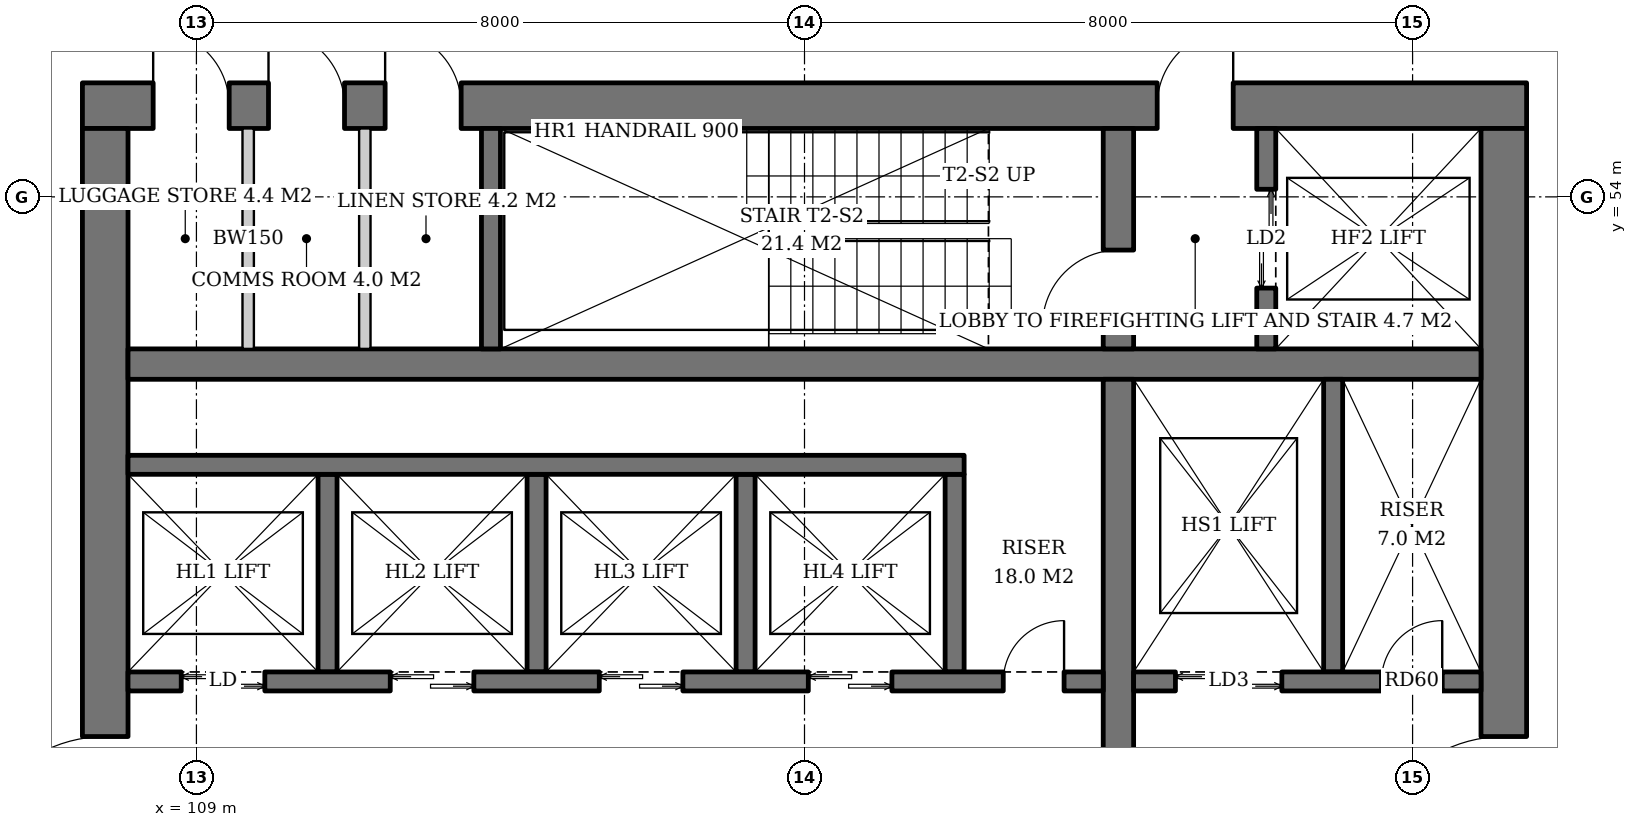
"""IFC4 building model, lengths in metres.
Left out: names, types, materials, properties, quantities, classifications, styles, units other than length and angle.
Written with IfcOpenShell. Run it as: python <this file> out.ifc"""

import sys

from ifc_helpers import new_model, si_unit, direction, frame, frame_2d, origin, place, context, subcontext, project, spatial, rectangle, extrude, element, fill, save


model = new_model("IFC4")
c1 = context("Model", 3, precision=1e-05, world=origin(), true_north=direction((0.0, 1.0)))
c2 = subcontext(c1, "Body", "Model", "MODEL_VIEW")
j1 = project(units=[si_unit("LENGTHUNIT", "METRE"), si_unit("PLANEANGLEUNIT", "RADIAN")], contexts=[c1])
p1 = place(None, origin())
s1 = spatial("IfcSite", under=j1, at=p1, CompositionType="ELEMENT")
p2 = place(p1, origin())
s2 = spatial("IfcBuilding", under=s1, at=p2, CompositionType="ELEMENT")
p3 = place(p2, frame((0.0, 0.0, 127.4)))
s3 = spatial("IfcBuildingStorey", under=s2, at=p3, CompositionType="ELEMENT", Elevation=127.4)
p4 = place(p3, frame((107.5, 55.2, 0.0), z_axis=(0.0, 0.0, 1.0), x_axis=(1.0, 0.0, 0.0)))
e1 = element("IfcWall", 1, at=p4, inside=s3, PredefinedType="SHEAR", context=c2, shape_type="SweptSolid", body=[
    extrude(rectangle(XDim=19.0, YDim=0.6, at=frame_2d((9.5, 0.0))), origin(), (0.0, 0.0, 1.0), 3.8),
])
p5 = place(p4, frame((14.14, 0.0, 0.0)))
e2 = element("IfcOpeningElement", 2, at=p5, cuts=e1, PredefinedType="OPENING", context=c2, shape_type="SweptSolid", body=[
    extrude(rectangle(XDim=1.0, YDim=2.1, at=frame_2d((0.5, 1.05))), frame((0.0, 0.31, 0.0), z_axis=(0.0, -1.0, 0.0), x_axis=(1.0, 0.0, 0.0)), (0.0, 0.0, 1.0), 0.62),
])
p6 = place(p4, frame((0.931, 0.0, 0.0)))
e3 = element("IfcOpeningElement", 3, at=p6, cuts=e1, PredefinedType="OPENING", context=c2, shape_type="SweptSolid", body=[
    extrude(rectangle(XDim=1.0, YDim=2.1, at=frame_2d((0.5, 1.05))), frame((0.0, 0.31, 0.0), z_axis=(0.0, -1.0, 0.0), x_axis=(1.0, 0.0, 0.0)), (0.0, 0.0, 1.0), 0.62),
])
p7 = place(p4, frame((2.448, 0.0, 0.0)))
e4 = element("IfcOpeningElement", 4, at=p7, cuts=e1, PredefinedType="OPENING", context=c2, shape_type="SweptSolid", body=[
    extrude(rectangle(XDim=1.0, YDim=2.1, at=frame_2d((0.5, 1.05))), frame((0.0, 0.31, 0.0), z_axis=(0.0, -1.0, 0.0), x_axis=(1.0, 0.0, 0.0)), (0.0, 0.0, 1.0), 0.62),
])
p8 = place(p4, frame((3.983, 0.0, 0.0)))
e5 = element("IfcOpeningElement", 5, at=p8, cuts=e1, PredefinedType="OPENING", context=c2, shape_type="SweptSolid", body=[
    extrude(rectangle(XDim=1.0, YDim=2.1, at=frame_2d((0.5, 1.05))), frame((0.0, 0.31, 0.0), z_axis=(0.0, -1.0, 0.0), x_axis=(1.0, 0.0, 0.0)), (0.0, 0.0, 1.0), 0.62),
])
p9 = place(p3, frame((107.8, 37.1, 0.0), z_axis=(0.0, 0.0, 1.0), x_axis=(0.0, 1.0, 0.0)))
e6 = element("IfcWall", 6, at=p9, inside=s3, PredefinedType="SHEAR", context=c2, shape_type="SweptSolid", body=[
    extrude(rectangle(XDim=17.8, YDim=0.6, at=frame_2d((8.9, 0.0))), origin(), (0.0, 0.0, 1.0), 3.8),
])
p10 = place(p9, frame((8.0, 0.0, 0.0)))
e7 = element("IfcOpeningElement", 7, at=p10, cuts=e6, PredefinedType="OPENING", context=c2, shape_type="SweptSolid", body=[
    extrude(rectangle(XDim=1.8, YDim=2.4, at=frame_2d((0.9, 1.2))), frame((0.0, 0.31, 0.0), z_axis=(0.0, -1.0, 0.0), x_axis=(1.0, 0.0, 0.0)), (0.0, 0.0, 1.0), 0.62),
])
p11 = place(p3, frame((126.2, 37.1, 0.0), z_axis=(0.0, 0.0, 1.0), x_axis=(0.0, 1.0, 0.0)))
e8 = element("IfcWall", 8, at=p11, inside=s3, PredefinedType="SHEAR", context=c2, shape_type="SweptSolid", body=[
    extrude(rectangle(XDim=17.8, YDim=0.6, at=frame_2d((8.9, 0.0))), origin(), (0.0, 0.0, 1.0), 3.8),
])
p12 = place(p11, frame((8.0, 0.0, 0.0)))
e9 = element("IfcOpeningElement", 9, at=p12, cuts=e8, PredefinedType="OPENING", context=c2, shape_type="SweptSolid", body=[
    extrude(rectangle(XDim=1.8, YDim=2.4, at=frame_2d((0.9, 1.2))), frame((0.0, 0.31, 0.0), z_axis=(0.0, -1.0, 0.0), x_axis=(1.0, 0.0, 0.0)), (0.0, 0.0, 1.0), 0.62),
])
p13 = place(p3, frame((108.1, 51.8, 0.0), z_axis=(0.0, 0.0, 1.0), x_axis=(1.0, 0.0, 0.0)))
e10 = element("IfcWall", 10, at=p13, inside=s3, PredefinedType="SHEAR", context=c2, shape_type="SweptSolid", body=[
    extrude(rectangle(XDim=17.8, YDim=0.4, at=frame_2d((8.9, 0.0))), origin(), (0.0, 0.0, 1.0), 3.8),
])
p14 = place(p3, frame((121.13, 40.4, 0.0), z_axis=(0.0, 0.0, 1.0), x_axis=(0.0, 1.0, 0.0)))
e11 = element("IfcWall", 11, at=p14, inside=s3, PredefinedType="SHEAR", context=c2, shape_type="SweptSolid", body=[
    extrude(rectangle(XDim=11.2, YDim=0.4, at=frame_2d((5.6, 0.0))), origin(), (0.0, 0.0, 1.0), 3.8),
])
p15 = place(p3, frame((121.13, 52.0, 0.0), z_axis=(0.0, 0.0, 1.0), x_axis=(0.0, 1.0, 0.0)))
e12 = element("IfcWall", 12, at=p15, inside=s3, PredefinedType="SHEAR", context=c2, shape_type="SweptSolid", body=[
    extrude(rectangle(XDim=2.9, YDim=0.4, at=frame_2d((1.45, 0.0))), origin(), (0.0, 0.0, 1.0), 3.8),
])
p16 = place(p15, frame((0.3, 0.0, 0.0)))
e13 = element("IfcOpeningElement", 13, at=p16, cuts=e12, PredefinedType="OPENING", context=c2, shape_type="SweptSolid", body=[
    extrude(rectangle(XDim=1.0, YDim=2.1, at=frame_2d((0.5, 1.05))), frame((0.0, 0.21, 0.0), z_axis=(0.0, -1.0, 0.0), x_axis=(1.0, 0.0, 0.0)), (0.0, 0.0, 1.0), 0.42),
])
p17 = place(p3, frame((112.875, 52.0, 0.0), z_axis=(0.0, 0.0, 1.0), x_axis=(0.0, 1.0, 0.0)))
e14 = element("IfcWall", 14, at=p17, inside=s3, PredefinedType="SHEAR", context=c2, shape_type="SweptSolid", body=[
    extrude(rectangle(XDim=2.9, YDim=0.25, at=frame_2d((1.45, 0.0))), origin(), (0.0, 0.0, 1.0), 3.8),
])
p18 = place(p3, frame((123.075, 52.0, 0.0), z_axis=(0.0, 0.0, 1.0), x_axis=(0.0, 1.0, 0.0)))
e15 = element("IfcWall", 15, at=p18, inside=s3, PredefinedType="SHEAR", context=c2, shape_type="SweptSolid", body=[
    extrude(rectangle(XDim=2.9, YDim=0.25, at=frame_2d((1.45, 0.0))), origin(), (0.0, 0.0, 1.0), 3.8),
])
p19 = place(p18, frame((0.8, 0.0, 0.0)))
e16 = element("IfcOpeningElement", 16, at=p19, cuts=e15, PredefinedType="OPENING", context=c2, shape_type="SweptSolid", body=[
    extrude(rectangle(XDim=1.3, YDim=2.2, at=frame_2d((0.65, 1.1))), frame((0.0, 0.135, 0.0), z_axis=(0.0, -1.0, 0.0), x_axis=(1.0, 0.0, 0.0)), (0.0, 0.0, 1.0), 0.27),
])
for number, where, z_axis, x_axis in (
    (17, (110.725, 47.75, 0.0), (0.0, 0.0, 1.0), (0.0, 1.0, 0.0)),
    (18, (113.475, 47.75, 0.0), (0.0, 0.0, 1.0), (0.0, 1.0, 0.0)),
    (19, (116.225, 47.75, 0.0), (0.0, 0.0, 1.0), (0.0, 1.0, 0.0)),
    (20, (118.975, 47.75, 0.0), (0.0, 0.0, 1.0), (0.0, 1.0, 0.0)),
):
    element("IfcWall", number, at=place(p3, frame(where, z_axis=z_axis, x_axis=x_axis)), inside=s3, PredefinedType="SHEAR", context=c2, shape_type="SweptSolid", body=[
        extrude(rectangle(XDim=2.6, YDim=0.25, at=frame_2d((1.3, 0.0))), origin(), (0.0, 0.0, 1.0), 3.8),
    ])
p20 = place(p3, frame((108.1, 50.475, 0.0), z_axis=(0.0, 0.0, 1.0), x_axis=(1.0, 0.0, 0.0)))
e21 = element("IfcWall", 21, at=p20, inside=s3, PredefinedType="SHEAR", context=c2, shape_type="SweptSolid", body=[
    extrude(rectangle(XDim=11.0, YDim=0.25, at=frame_2d((5.5, 0.0))), origin(), (0.0, 0.0, 1.0), 3.8),
])
p21 = place(p3, frame((108.1, 47.625, 0.0), z_axis=(0.0, 0.0, 1.0), x_axis=(1.0, 0.0, 0.0)))
e22 = element("IfcWall", 22, at=p21, inside=s3, PredefinedType="SHEAR", context=c2, shape_type="SweptSolid", body=[
    extrude(rectangle(XDim=12.83, YDim=0.25, at=frame_2d((6.415, 0.0))), origin(), (0.0, 0.0, 1.0), 3.8),
])
p22 = place(p21, frame((0.7, 0.0, 0.0)))
e23 = element("IfcOpeningElement", 23, at=p22, cuts=e22, PredefinedType="OPENING", context=c2, shape_type="SweptSolid", body=[
    extrude(rectangle(XDim=1.1, YDim=2.2, at=frame_2d((0.55, 1.1))), frame((0.0, 0.135, 0.0), z_axis=(0.0, -1.0, 0.0), x_axis=(1.0, 0.0, 0.0)), (0.0, 0.0, 1.0), 0.27),
])
p23 = place(p21, frame((3.45, 0.0, 0.0)))
e24 = element("IfcOpeningElement", 24, at=p23, cuts=e22, PredefinedType="OPENING", context=c2, shape_type="SweptSolid", body=[
    extrude(rectangle(XDim=1.1, YDim=2.2, at=frame_2d((0.55, 1.1))), frame((0.0, 0.135, 0.0), z_axis=(0.0, -1.0, 0.0), x_axis=(1.0, 0.0, 0.0)), (0.0, 0.0, 1.0), 0.27),
])
p24 = place(p21, frame((6.2, 0.0, 0.0)))
e25 = element("IfcOpeningElement", 25, at=p24, cuts=e22, PredefinedType="OPENING", context=c2, shape_type="SweptSolid", body=[
    extrude(rectangle(XDim=1.1, YDim=2.2, at=frame_2d((0.55, 1.1))), frame((0.0, 0.135, 0.0), z_axis=(0.0, -1.0, 0.0), x_axis=(1.0, 0.0, 0.0)), (0.0, 0.0, 1.0), 0.27),
])
p25 = place(p21, frame((8.95, 0.0, 0.0)))
e26 = element("IfcOpeningElement", 26, at=p25, cuts=e22, PredefinedType="OPENING", context=c2, shape_type="SweptSolid", body=[
    extrude(rectangle(XDim=1.1, YDim=2.2, at=frame_2d((0.55, 1.1))), frame((0.0, 0.135, 0.0), z_axis=(0.0, -1.0, 0.0), x_axis=(1.0, 0.0, 0.0)), (0.0, 0.0, 1.0), 0.27),
])
p26 = place(p21, frame((11.515, 0.0, 0.0)))
e27 = element("IfcOpeningElement", 27, at=p26, cuts=e22, PredefinedType="OPENING", context=c2, shape_type="SweptSolid", body=[
    extrude(rectangle(XDim=0.8, YDim=2.0, at=frame_2d((0.4, 1.0))), frame((0.0, 0.135, 0.0), z_axis=(0.0, -1.0, 0.0), x_axis=(1.0, 0.0, 0.0)), (0.0, 0.0, 1.0), 0.27),
])
p27 = place(p3, frame((123.955, 47.75, 0.0), z_axis=(0.0, 0.0, 1.0), x_axis=(0.0, 1.0, 0.0)))
e28 = element("IfcWall", 28, at=p27, inside=s3, PredefinedType="SHEAR", context=c2, shape_type="SweptSolid", body=[
    extrude(rectangle(XDim=3.85, YDim=0.25, at=frame_2d((1.925, 0.0))), origin(), (0.0, 0.0, 1.0), 3.8),
])
p28 = place(p3, frame((121.33, 47.625, 0.0), z_axis=(0.0, 0.0, 1.0), x_axis=(1.0, 0.0, 0.0)))
e29 = element("IfcWall", 29, at=p28, inside=s3, PredefinedType="SHEAR", context=c2, shape_type="SweptSolid", body=[
    extrude(rectangle(XDim=4.57, YDim=0.25, at=frame_2d((2.285, 0.0))), origin(), (0.0, 0.0, 1.0), 3.8),
])
p29 = place(p28, frame((0.55, 0.0, 0.0)))
e30 = element("IfcOpeningElement", 30, at=p29, cuts=e29, PredefinedType="OPENING", context=c2, shape_type="SweptSolid", body=[
    extrude(rectangle(XDim=1.4, YDim=2.4, at=frame_2d((0.7, 1.2))), frame((0.0, 0.135, 0.0), z_axis=(0.0, -1.0, 0.0), x_axis=(1.0, 0.0, 0.0)), (0.0, 0.0, 1.0), 0.27),
])
p30 = place(p28, frame((3.26, 0.0, 0.0)))
e31 = element("IfcOpeningElement", 31, at=p30, cuts=e29, PredefinedType="OPENING", context=c2, shape_type="SweptSolid", body=[
    extrude(rectangle(XDim=0.8, YDim=2.0, at=frame_2d((0.4, 1.0))), frame((0.0, 0.135, 0.0), z_axis=(0.0, -1.0, 0.0), x_axis=(1.0, 0.0, 0.0)), (0.0, 0.0, 1.0), 0.27),
])
for number, where, z_axis, x_axis in (
    (32, (109.681, 52.0, 0.0), (0.0, 0.0, 1.0), (0.0, 1.0, 0.0)),
    (33, (111.216, 52.0, 0.0), (0.0, 0.0, 1.0), (0.0, 1.0, 0.0)),
):
    element("IfcWall", number, at=place(p3, frame(where, z_axis=z_axis, x_axis=x_axis)), inside=s3, PredefinedType="SOLIDWALL", context=c2, shape_type="SweptSolid", body=[
        extrude(rectangle(XDim=2.9, YDim=0.15, at=frame_2d((1.45, 0.0))), origin(), (0.0, 0.0, 1.0), 3.35),
    ])
p31 = place(p19, origin())
e34 = element("IfcDoor", 34, at=p31, inside=s3, OperationType="DOUBLE_DOOR_SLIDING", PredefinedType="DOOR", context=c2, shape_type="SweptSolid", body=[
    extrude(rectangle(XDim=1.3, YDim=2.2, at=frame_2d((0.65, 1.1))), frame((0.0, 0.025, 0.0), z_axis=(0.0, -1.0, 0.0), x_axis=(1.0, 0.0, 0.0)), (0.0, 0.0, 1.0), 0.05),
])
fill(e16, e34)
p32 = place(p22, origin())
e35 = element("IfcDoor", 35, at=p32, inside=s3, OperationType="DOUBLE_DOOR_SLIDING", PredefinedType="DOOR", context=c2, shape_type="SweptSolid", body=[
    extrude(rectangle(XDim=1.1, YDim=2.2, at=frame_2d((0.55, 1.1))), frame((0.0, 0.025, 0.0), z_axis=(0.0, -1.0, 0.0), x_axis=(1.0, 0.0, 0.0)), (0.0, 0.0, 1.0), 0.05),
])
fill(e23, e35)
p33 = place(p23, origin())
e36 = element("IfcDoor", 36, at=p33, inside=s3, OperationType="DOUBLE_DOOR_SLIDING", PredefinedType="DOOR", context=c2, shape_type="SweptSolid", body=[
    extrude(rectangle(XDim=1.1, YDim=2.2, at=frame_2d((0.55, 1.1))), frame((0.0, 0.025, 0.0), z_axis=(0.0, -1.0, 0.0), x_axis=(1.0, 0.0, 0.0)), (0.0, 0.0, 1.0), 0.05),
])
fill(e24, e36)
p34 = place(p24, origin())
e37 = element("IfcDoor", 37, at=p34, inside=s3, OperationType="DOUBLE_DOOR_SLIDING", PredefinedType="DOOR", context=c2, shape_type="SweptSolid", body=[
    extrude(rectangle(XDim=1.1, YDim=2.2, at=frame_2d((0.55, 1.1))), frame((0.0, 0.025, 0.0), z_axis=(0.0, -1.0, 0.0), x_axis=(1.0, 0.0, 0.0)), (0.0, 0.0, 1.0), 0.05),
])
fill(e25, e37)
p35 = place(p25, origin())
e38 = element("IfcDoor", 38, at=p35, inside=s3, OperationType="DOUBLE_DOOR_SLIDING", PredefinedType="DOOR", context=c2, shape_type="SweptSolid", body=[
    extrude(rectangle(XDim=1.1, YDim=2.2, at=frame_2d((0.55, 1.1))), frame((0.0, 0.025, 0.0), z_axis=(0.0, -1.0, 0.0), x_axis=(1.0, 0.0, 0.0)), (0.0, 0.0, 1.0), 0.05),
])
fill(e26, e38)
p36 = place(p26, origin())
e39 = element("IfcDoor", 39, at=p36, inside=s3, OperationType="SINGLE_SWING_RIGHT", PredefinedType="DOOR", context=c2, shape_type="SweptSolid", body=[
    extrude(rectangle(XDim=0.8, YDim=2.0, at=frame_2d((0.4, 1.0))), frame((0.0, 0.025, 0.0), z_axis=(0.0, -1.0, 0.0), x_axis=(1.0, 0.0, 0.0)), (0.0, 0.0, 1.0), 0.05),
])
fill(e27, e39)
p37 = place(p29, origin())
e40 = element("IfcDoor", 40, at=p37, inside=s3, OperationType="DOUBLE_DOOR_SLIDING", PredefinedType="DOOR", context=c2, shape_type="SweptSolid", body=[
    extrude(rectangle(XDim=1.4, YDim=2.4, at=frame_2d((0.7, 1.2))), frame((0.0, 0.025, 0.0), z_axis=(0.0, -1.0, 0.0), x_axis=(1.0, 0.0, 0.0)), (0.0, 0.0, 1.0), 0.05),
])
fill(e30, e40)
p38 = place(p30, origin())
e41 = element("IfcDoor", 41, at=p38, inside=s3, OperationType="SINGLE_SWING_RIGHT", PredefinedType="DOOR", context=c2, shape_type="SweptSolid", body=[
    extrude(rectangle(XDim=0.8, YDim=2.0, at=frame_2d((0.4, 1.0))), frame((0.0, 0.025, 0.0), z_axis=(0.0, -1.0, 0.0), x_axis=(1.0, 0.0, 0.0)), (0.0, 0.0, 1.0), 0.05),
])
fill(e31, e41)
p39 = place(p16, origin())
e42 = element("IfcDoor", 42, at=p39, inside=s3, OperationType="SINGLE_SWING_LEFT", PredefinedType="DOOR", context=c2, shape_type="SweptSolid", body=[
    extrude(rectangle(XDim=1.0, YDim=2.1, at=frame_2d((0.5, 1.05))), frame((0.0, 0.025, 0.0), z_axis=(0.0, -1.0, 0.0), x_axis=(1.0, 0.0, 0.0)), (0.0, 0.0, 1.0), 0.05),
])
fill(e13, e42)
p40 = place(p5, origin())
e43 = element("IfcDoor", 43, at=p40, inside=s3, OperationType="SINGLE_SWING_RIGHT", PredefinedType="DOOR", context=c2, shape_type="SweptSolid", body=[
    extrude(rectangle(XDim=1.0, YDim=2.1, at=frame_2d((0.5, 1.05))), frame((0.0, 0.025, 0.0), z_axis=(0.0, -1.0, 0.0), x_axis=(1.0, 0.0, 0.0)), (0.0, 0.0, 1.0), 0.05),
])
fill(e2, e43)
p41 = place(p10, origin())
e44 = element("IfcDoor", 44, at=p41, inside=s3, OperationType="DOUBLE_DOOR_SINGLE_SWING", PredefinedType="DOOR", context=c2, shape_type="SweptSolid", body=[
    extrude(rectangle(XDim=1.8, YDim=2.4, at=frame_2d((0.9, 1.2))), frame((0.0, 0.025, 0.0), z_axis=(0.0, -1.0, 0.0), x_axis=(1.0, 0.0, 0.0)), (0.0, 0.0, 1.0), 0.05),
])
fill(e7, e44)
p42 = place(p12, origin())
e45 = element("IfcDoor", 45, at=p42, inside=s3, OperationType="DOUBLE_DOOR_SINGLE_SWING", PredefinedType="DOOR", context=c2, shape_type="SweptSolid", body=[
    extrude(rectangle(XDim=1.8, YDim=2.4, at=frame_2d((0.9, 1.2))), frame((0.0, 0.025, 0.0), z_axis=(0.0, -1.0, 0.0), x_axis=(1.0, 0.0, 0.0)), (0.0, 0.0, 1.0), 0.05),
])
fill(e9, e45)
p43 = place(p6, origin())
e46 = element("IfcDoor", 46, at=p43, inside=s3, OperationType="SINGLE_SWING_LEFT", PredefinedType="DOOR", context=c2, shape_type="SweptSolid", body=[
    extrude(rectangle(XDim=1.0, YDim=2.1, at=frame_2d((0.5, 1.05))), frame((0.0, -0.24, 0.0), z_axis=(0.0, -1.0, 0.0), x_axis=(1.0, 0.0, 0.0)), (0.0, 0.0, 1.0), 0.05),
])
fill(e3, e46)
p44 = place(p7, origin())
e47 = element("IfcDoor", 47, at=p44, inside=s3, OperationType="SINGLE_SWING_LEFT", PredefinedType="DOOR", context=c2, shape_type="SweptSolid", body=[
    extrude(rectangle(XDim=1.0, YDim=2.1, at=frame_2d((0.5, 1.05))), frame((0.0, -0.24, 0.0), z_axis=(0.0, -1.0, 0.0), x_axis=(1.0, 0.0, 0.0)), (0.0, 0.0, 1.0), 0.05),
])
fill(e4, e47)
p45 = place(p8, origin())
e48 = element("IfcDoor", 48, at=p45, inside=s3, OperationType="SINGLE_SWING_LEFT", PredefinedType="DOOR", context=c2, shape_type="SweptSolid", body=[
    extrude(rectangle(XDim=1.0, YDim=2.1, at=frame_2d((0.5, 1.05))), frame((0.0, -0.24, 0.0), z_axis=(0.0, -1.0, 0.0), x_axis=(1.0, 0.0, 0.0)), (0.0, 0.0, 1.0), 0.05),
])
fill(e5, e48)
save(model, sys.argv[1])
